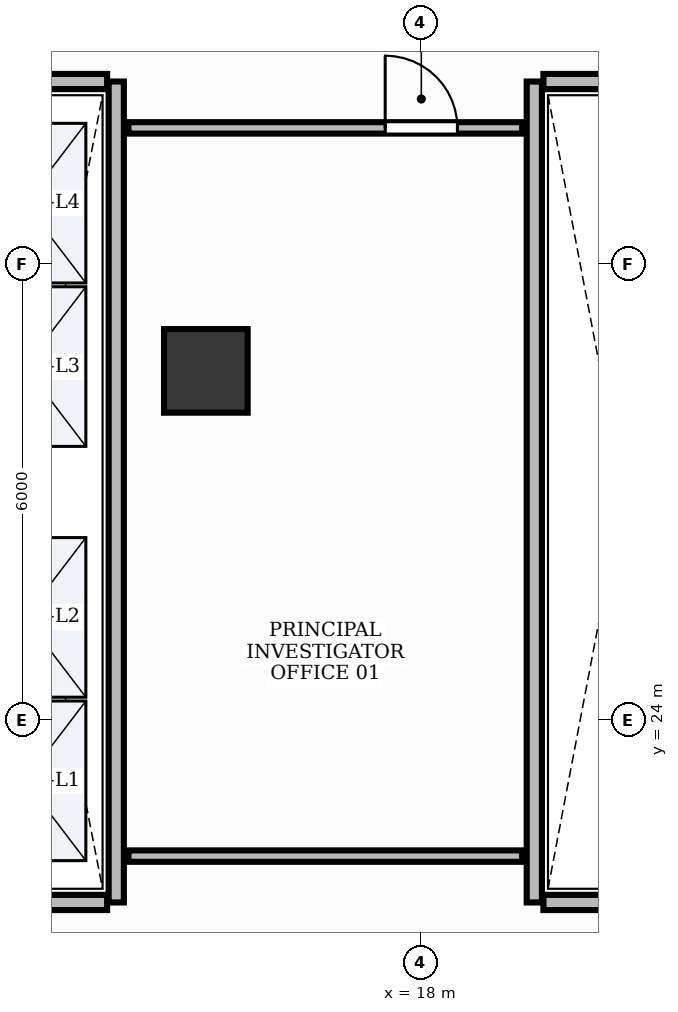
"""IFC4 building model, lengths in metres.
Left out: names, types, materials, properties, quantities, classifications, styles, units other than length and angle.
Written with IfcOpenShell. Run it as: python <this file> out.ifc"""

import sys

from ifc_helpers import new_model, si_unit, direction, frame, frame_2d, origin, origin_2d, place, context, subcontext, project, spatial, rectangle, extrude, element, fill, save


model = new_model("IFC4")
c1 = context("Model", 3, precision=1e-05, world=origin(), true_north=direction((0.0, 1.0)))
c2 = subcontext(c1, "Body", "Model", "MODEL_VIEW")
j1 = project(units=[si_unit("LENGTHUNIT", "METRE"), si_unit("PLANEANGLEUNIT", "RADIAN")], contexts=[c1])
p1 = place(None, origin())
s1 = spatial("IfcSite", under=j1, at=p1, CompositionType="ELEMENT")
p2 = place(p1, origin())
s2 = spatial("IfcBuilding", under=s1, at=p2, CompositionType="ELEMENT")
p3 = place(p2, frame((0.0, 0.0, 34.2)))
s3 = spatial("IfcBuildingStorey", under=s2, at=p3, CompositionType="ELEMENT", Elevation=34.2)
p4 = place(p3, frame((15.179, 28.594, -0.0), z_axis=(0.0, 0.0, 1.0), x_axis=(1.0, 0.0, 0.0)))
e1 = element("IfcColumn", 1, at=p4, inside=s3, PredefinedType="COLUMN", context=c2, shape_type="SweptSolid", body=[
    extrude(rectangle(XDim=1.1, YDim=1.1, at=origin_2d()), origin(), (0.0, 0.0, 1.0), 3.901),
])
p5 = place(p3, frame((14.0, 21.6, 0.0), z_axis=(0.0, 0.0, 1.0), x_axis=(0.0, 1.0, 0.0)))
e2 = element("IfcWall", 2, at=p5, inside=s3, PredefinedType="PARTITIONING", context=c2, shape_type="SweptSolid", body=[
    extrude(rectangle(XDim=10.8, YDim=0.2, at=frame_2d((5.4, 0.0))), origin(), (0.0, 0.0, 1.0), 2.91),
])
for number, where, z_axis, x_axis in (
    (3, (11.72, 21.6, 0.0), (0.0, 0.0, 1.0), (1.0, 0.0, 0.0)),
    (4, (11.72, 32.4, 0.0), (0.0, 0.0, 1.0), (1.0, 0.0, 0.0)),
):
    element("IfcWall", number, at=place(p3, frame(where, z_axis=z_axis, x_axis=x_axis)), inside=s3, PredefinedType="PARTITIONING", context=c2, shape_type="SweptSolid", body=[
        extrude(rectangle(XDim=2.16, YDim=0.2, at=frame_2d((1.08, 0.0))), origin(), (0.0, 0.0, 1.0), 2.91),
    ])
p6 = place(p3, frame((19.5, 21.6, 0.0), z_axis=(0.0, 0.0, 1.0), x_axis=(0.0, 1.0, 0.0)))
e5 = element("IfcWall", 5, at=p6, inside=s3, PredefinedType="PARTITIONING", context=c2, shape_type="SweptSolid", body=[
    extrude(rectangle(XDim=10.8, YDim=0.2, at=frame_2d((5.4, 0.0))), origin(), (0.0, 0.0, 1.0), 2.91),
])
for number, where, z_axis, x_axis in (
    (6, (19.62, 21.6, 0.0), (0.0, 0.0, 1.0), (1.0, 0.0, 0.0)),
    (7, (19.62, 32.4, 0.0), (0.0, 0.0, 1.0), (1.0, 0.0, 0.0)),
):
    element("IfcWall", number, at=place(p3, frame(where, z_axis=z_axis, x_axis=x_axis)), inside=s3, PredefinedType="PARTITIONING", context=c2, shape_type="SweptSolid", body=[
        extrude(rectangle(XDim=2.11, YDim=0.2, at=frame_2d((1.055, 0.0))), origin(), (0.0, 0.0, 1.0), 2.91),
    ])
p7 = place(p3, frame((14.16, 31.79, 0.0), z_axis=(0.0, 0.0, 1.0), x_axis=(1.0, 0.0, 0.0)))
e8 = element("IfcWall", 8, at=p7, inside=s3, PredefinedType="PARTITIONING", context=c2, shape_type="SweptSolid", body=[
    extrude(rectangle(XDim=5.18, YDim=0.15, at=frame_2d((2.59, 0.0))), origin(), (0.0, 0.0, 1.0), 2.91),
])
p8 = place(p7, frame((3.378, 0.0, 0.0)))
e9 = element("IfcOpeningElement", 9, at=p8, cuts=e8, PredefinedType="OPENING", context=c2, shape_type="SweptSolid", body=[
    extrude(rectangle(XDim=0.95, YDim=2.15, at=frame_2d((0.475, 1.075))), frame((0.0, 0.09, 0.0), z_axis=(0.0, -1.0, 0.0), x_axis=(1.0, 0.0, 0.0)), (0.0, 0.0, 1.0), 0.18),
])
p9 = place(p3, frame((19.34, 22.21, 0.0), z_axis=(0.0, 0.0, 1.0), x_axis=(-1.0, 0.0, 0.0)))
e10 = element("IfcWall", 10, at=p9, inside=s3, PredefinedType="PARTITIONING", context=c2, shape_type="SweptSolid", body=[
    extrude(rectangle(XDim=5.18, YDim=0.15, at=frame_2d((2.59, 0.0))), origin(), (0.0, 0.0, 1.0), 2.91),
])
p10 = place(p8, origin())
e11 = element("IfcDoor", 11, at=p10, inside=s3, OperationType="SINGLE_SWING_LEFT", PredefinedType="DOOR", context=c2, shape_type="SweptSolid", body=[
    extrude(rectangle(XDim=0.95, YDim=2.15, at=frame_2d((0.475, 1.075))), frame((0.0, 0.025, 0.0), z_axis=(0.0, -1.0, 0.0), x_axis=(1.0, 0.0, 0.0)), (0.0, 0.0, 1.0), 0.05),
])
fill(e9, e11)
save(model, sys.argv[1])
